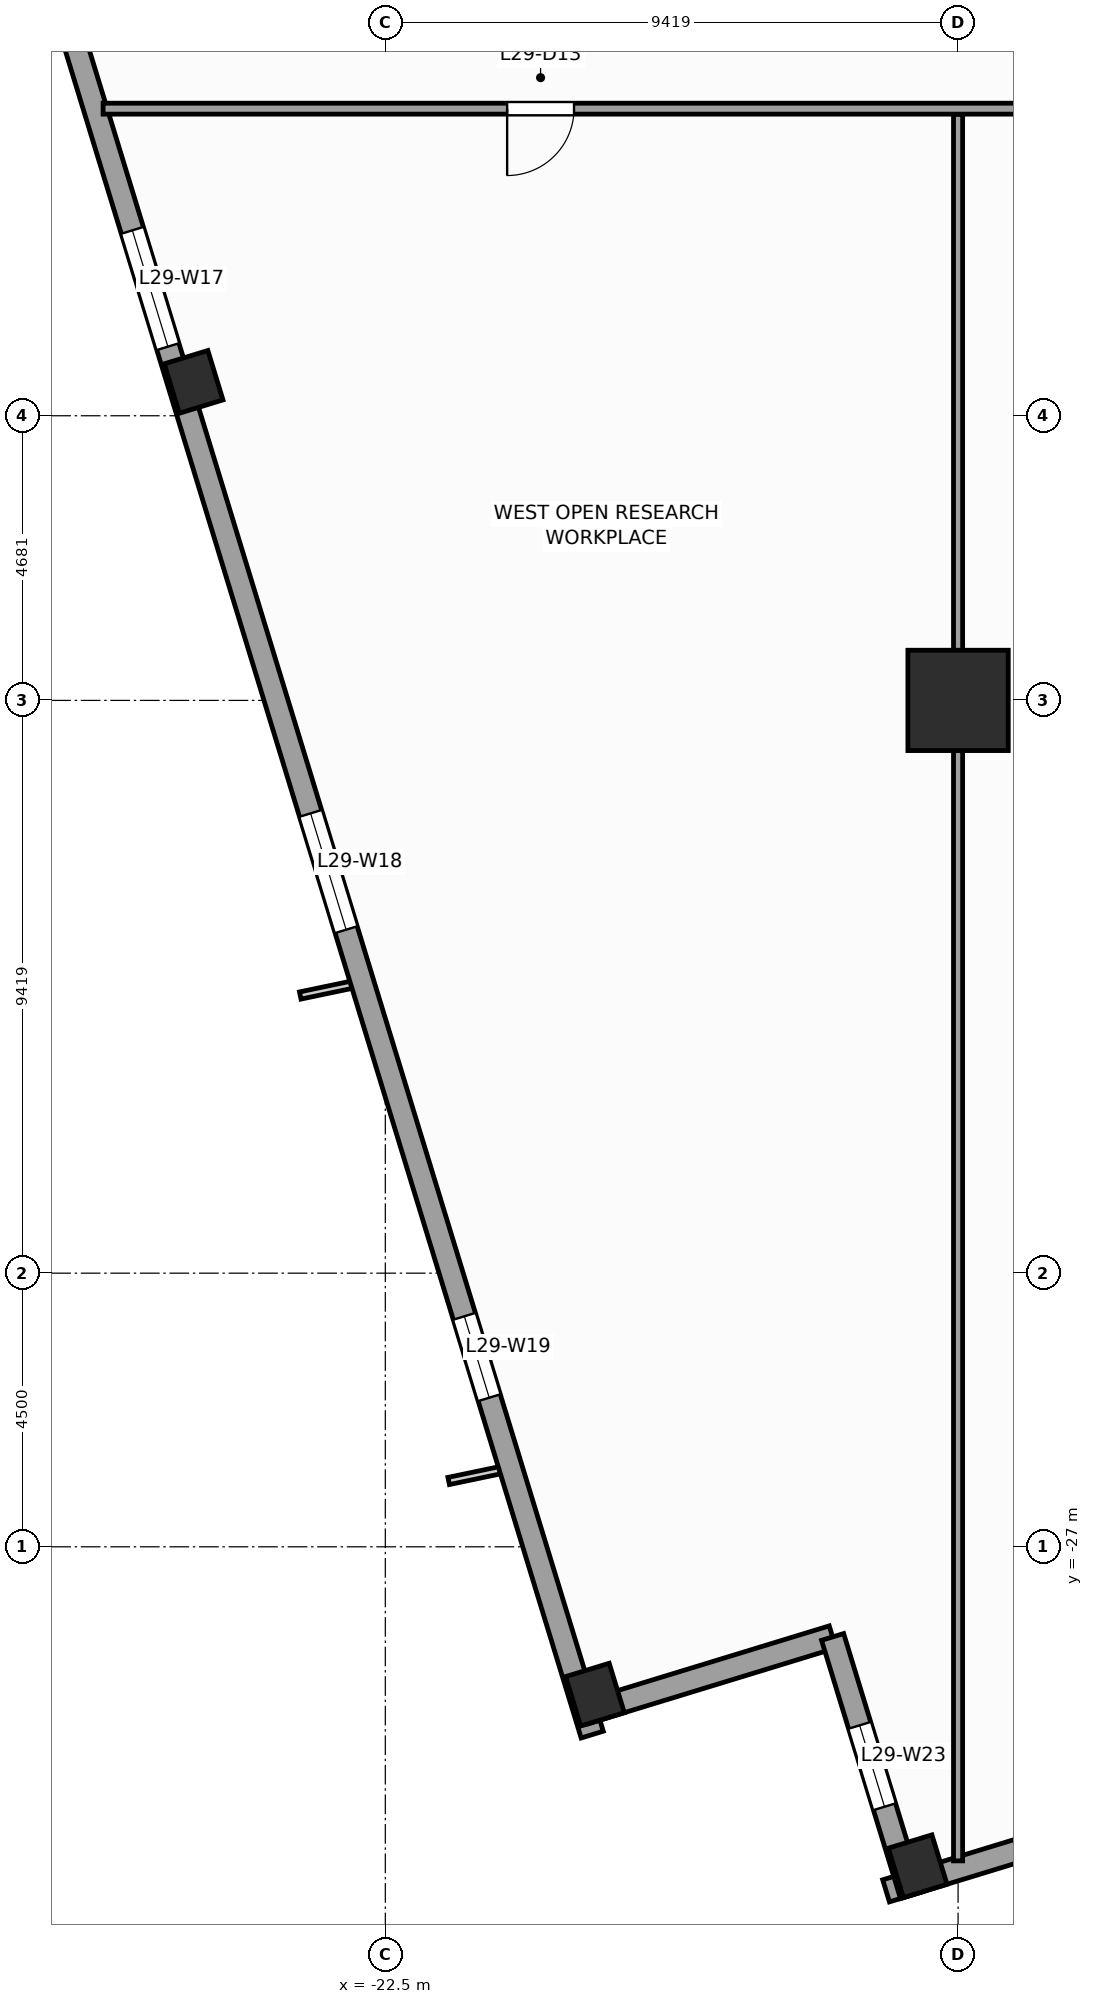
"""IFC4 building model, lengths in metres.
Left out: names, types, materials, properties, quantities, classifications, styles, units other than length and angle.
Written with IfcOpenShell. Run it as: python <this file> out.ifc"""

import sys

from ifc_helpers import new_model, si_unit, direction, frame, frame_2d, origin, origin_2d, place, context, subcontext, project, spatial, rectangle, extrude, source, transform, mapped, element, fill, save


model = new_model("IFC4")
c1 = context("Model", 3, precision=1e-05, world=origin(), true_north=direction((0.0, 1.0)))
c2 = subcontext(c1, "Body", "Model", "MODEL_VIEW")
j1 = project(units=[si_unit("LENGTHUNIT", "METRE"), si_unit("PLANEANGLEUNIT", "RADIAN")], contexts=[c1])
p1 = place(None, origin())
s1 = spatial("IfcSite", under=j1, at=p1, CompositionType="ELEMENT")
p2 = place(p1, origin())
s2 = spatial("IfcBuilding", under=s1, at=p2, CompositionType="ELEMENT")
p3 = place(p2, frame((0.0, 0.0, 123.2)))
s3 = spatial("IfcBuildingStorey", under=s2, at=p3, CompositionType="ELEMENT", Elevation=123.2)
m1 = source(origin(), c2, "Body", "SweptSolid", [
    extrude(rectangle(XDim=1.65, YDim=1.65, at=origin_2d()), origin(), (0.0, 0.0, 1.0), 4.0),
])
p4 = place(p3, frame((-13.081, -13.081, 0.0), z_axis=(0.0, 0.0, 1.0), x_axis=(1.0, 0.0, 0.0)))
e1 = element("IfcColumn", 1, at=p4, inside=s3, PredefinedType="COLUMN", context=c2, shape_type="MappedRepresentation", body=[
    mapped(m1, transform((0.0, 0.0, 0.0), scale=1.0)),
])
m2 = source(origin(), c2, "Body", "SweptSolid", [
    extrude(rectangle(XDim=0.75, YDim=0.85, at=origin_2d()), origin(), (0.0, 0.0, 1.0), 4.0),
])
for number, where, z_axis, x_axis in (
    (2, (-13.746, -32.253, 0.0), (0.0, 0.0, 1.0), (0.956, 0.292, 0.0)),
    (3, (-25.653, -7.843, 0.0), (0.0, 0.0, 1.0), (0.956, 0.292, 0.0)),
    (4, (-19.052, -29.431, 0.0), (0.0, 0.0, 1.0), (0.956, 0.292, 0.0)),
):
    element("IfcColumn", number, at=place(p3, frame(where, z_axis=z_axis, x_axis=x_axis)), inside=s3, PredefinedType="COLUMN", context=c2, shape_type="MappedRepresentation", body=[
        mapped(m2, transform((0.0, 0.0, 0.0), scale=1.0)),
    ])
p5 = place(p3, frame((-14.265, -32.658, 0.0), z_axis=(0.0, 0.0, 1.0), x_axis=(0.956304320851, 0.292373127906, 0.0)))
e5 = element("IfcWall", 5, at=p5, inside=s3, PredefinedType="STANDARD", context=c2, shape_type="SweptSolid", body=[
    extrude(rectangle(XDim=46.38, YDim=0.38, at=frame_2d((23.19, 0.0))), origin(), (0.0, 0.0, 1.0), 3.14),
])
p6 = place(p5, frame((28.265, 0.0, 0.0)))
e6 = element("IfcOpeningElement", 6, at=p6, cuts=e5, PredefinedType="OPENING", context=c2, shape_type="SweptSolid", body=[
    extrude(rectangle(XDim=1.05, YDim=2.25, at=frame_2d((0.525, 1.125))), frame((0.0, 0.2, 0.0), z_axis=(0.0, -1.0, 0.0), x_axis=(1.0, 0.0, 0.0)), (0.0, 0.0, 1.0), 0.4),
])
p7 = place(p5, frame((4.865, 0.0, 0.51)))
e7 = element("IfcOpeningElement", 7, at=p7, cuts=e5, PredefinedType="OPENING", context=c2, shape_type="SweptSolid", body=[
    extrude(rectangle(XDim=1.4, YDim=2.4, at=frame_2d((0.7, 1.2))), frame((0.0, 0.2, 0.0), z_axis=(0.0, -1.0, 0.0), x_axis=(1.0, 0.0, 0.0)), (0.0, 0.0, 1.0), 0.4),
])
p8 = place(p5, frame((10.95, 0.0, 0.51)))
e8 = element("IfcOpeningElement", 8, at=p8, cuts=e5, PredefinedType="OPENING", context=c2, shape_type="SweptSolid", body=[
    extrude(rectangle(XDim=2.0, YDim=2.4, at=frame_2d((1.0, 1.2))), frame((0.0, 0.2, 0.0), z_axis=(0.0, -1.0, 0.0), x_axis=(1.0, 0.0, 0.0)), (0.0, 0.0, 1.0), 0.4),
])
p9 = place(p5, frame((20.512, 0.0, 0.51)))
e9 = element("IfcOpeningElement", 9, at=p9, cuts=e5, PredefinedType="OPENING", context=c2, shape_type="SweptSolid", body=[
    extrude(rectangle(XDim=2.0, YDim=2.4, at=frame_2d((1.0, 1.2))), frame((0.0, 0.2, 0.0), z_axis=(0.0, -1.0, 0.0), x_axis=(1.0, 0.0, 0.0)), (0.0, 0.0, 1.0), 0.4),
])
p10 = place(p5, frame((30.538, 0.0, 0.51)))
e10 = element("IfcOpeningElement", 10, at=p10, cuts=e5, PredefinedType="OPENING", context=c2, shape_type="SweptSolid", body=[
    extrude(rectangle(XDim=2.0, YDim=2.4, at=frame_2d((1.0, 1.2))), frame((0.0, 0.2, 0.0), z_axis=(0.0, -1.0, 0.0), x_axis=(1.0, 0.0, 0.0)), (0.0, 0.0, 1.0), 0.4),
])
p11 = place(p5, frame((39.187, 0.0, 0.51)))
e11 = element("IfcOpeningElement", 11, at=p11, cuts=e5, PredefinedType="OPENING", context=c2, shape_type="SweptSolid", body=[
    extrude(rectangle(XDim=1.4, YDim=2.4, at=frame_2d((0.7, 1.2))), frame((0.0, 0.2, 0.0), z_axis=(0.0, -1.0, 0.0), x_axis=(1.0, 0.0, 0.0)), (0.0, 0.0, 1.0), 0.4),
])
p12 = place(p3, frame((-32.658, 14.265, 0.0), z_axis=(0.0, 0.0, 1.0), x_axis=(0.292373127906, -0.956304320851, 0.0)))
e12 = element("IfcWall", 12, at=p12, inside=s3, PredefinedType="STANDARD", context=c2, shape_type="SweptSolid", body=[
    extrude(rectangle(XDim=46.38, YDim=0.38, at=frame_2d((23.19, 0.0))), origin(), (0.0, 0.0, 1.0), 3.14),
])
p13 = place(p12, frame((4.865, 0.0, 0.51)))
e13 = element("IfcOpeningElement", 13, at=p13, cuts=e12, PredefinedType="OPENING", context=c2, shape_type="SweptSolid", body=[
    extrude(rectangle(XDim=1.4, YDim=2.4, at=frame_2d((0.7, 1.2))), frame((0.0, 0.2, 0.0), z_axis=(0.0, -1.0, 0.0), x_axis=(1.0, 0.0, 0.0)), (0.0, 0.0, 1.0), 0.4),
])
p14 = place(p12, frame((12.45, 0.0, 0.51)))
e14 = element("IfcOpeningElement", 14, at=p14, cuts=e12, PredefinedType="OPENING", context=c2, shape_type="SweptSolid", body=[
    extrude(rectangle(XDim=2.0, YDim=2.4, at=frame_2d((1.0, 1.2))), frame((0.0, 0.2, 0.0), z_axis=(0.0, -1.0, 0.0), x_axis=(1.0, 0.0, 0.0)), (0.0, 0.0, 1.0), 0.4),
])
p15 = place(p12, frame((20.512, 0.0, 0.51)))
e15 = element("IfcOpeningElement", 15, at=p15, cuts=e12, PredefinedType="OPENING", context=c2, shape_type="SweptSolid", body=[
    extrude(rectangle(XDim=2.0, YDim=2.4, at=frame_2d((1.0, 1.2))), frame((0.0, 0.2, 0.0), z_axis=(0.0, -1.0, 0.0), x_axis=(1.0, 0.0, 0.0)), (0.0, 0.0, 1.0), 0.4),
])
p16 = place(p12, frame((30.538, 0.0, 0.51)))
e16 = element("IfcOpeningElement", 16, at=p16, cuts=e12, PredefinedType="OPENING", context=c2, shape_type="SweptSolid", body=[
    extrude(rectangle(XDim=2.0, YDim=2.4, at=frame_2d((1.0, 1.2))), frame((0.0, 0.2, 0.0), z_axis=(0.0, -1.0, 0.0), x_axis=(1.0, 0.0, 0.0)), (0.0, 0.0, 1.0), 0.4),
])
p17 = place(p12, frame((39.187, 0.0, 0.51)))
e17 = element("IfcOpeningElement", 17, at=p17, cuts=e12, PredefinedType="OPENING", context=c2, shape_type="SweptSolid", body=[
    extrude(rectangle(XDim=1.4, YDim=2.4, at=frame_2d((0.7, 1.2))), frame((0.0, 0.2, 0.0), z_axis=(0.0, -1.0, 0.0), x_axis=(1.0, 0.0, 0.0)), (0.0, 0.0, 1.0), 0.4),
])
p18 = place(p3, frame((-19.208, -29.725, 0.0), z_axis=(0.0, 0.0, 1.0), x_axis=(0.956312764915, 0.292345507338, 0.0)))
e18 = element("IfcWall", 18, at=p18, inside=s3, PredefinedType="STANDARD", context=c2, shape_type="SweptSolid", body=[
    extrude(rectangle(XDim=4.25, YDim=0.38, at=frame_2d((2.125, 0.0))), origin(), (0.0, 0.0, 1.0), 3.74),
])
p19 = place(p3, frame((-15.144, -28.482, 0.0), z_axis=(0.0, 0.0, 1.0), x_axis=(0.292373601522, -0.956304176051, 0.0)))
e19 = element("IfcWall", 19, at=p19, inside=s3, PredefinedType="STANDARD", context=c2, shape_type="SweptSolid", body=[
    extrude(rectangle(XDim=4.44, YDim=0.38, at=frame_2d((2.22, 0.0))), origin(), (0.0, 0.0, 1.0), 3.04),
])
p20 = place(p19, frame((1.52, 0.0, 0.51)))
e20 = element("IfcOpeningElement", 20, at=p20, cuts=e19, PredefinedType="OPENING", context=c2, shape_type="SweptSolid", body=[
    extrude(rectangle(XDim=1.4, YDim=2.4, at=frame_2d((0.7, 1.2))), frame((0.0, 0.2, 0.0), z_axis=(0.0, -1.0, 0.0), x_axis=(1.0, 0.0, 0.0)), (0.0, 0.0, 1.0), 0.4),
])
p21 = place(p3, frame((-27.142, -3.35, 0.0), z_axis=(0.0, 0.0, 1.0), x_axis=(1.0, 0.0, 0.0)))
e21 = element("IfcWall", 21, at=p21, inside=s3, PredefinedType="PARTITIONING", context=c2, shape_type="SweptSolid", body=[
    extrude(rectangle(XDim=16.592, YDim=0.18, at=frame_2d((8.296, 0.0))), origin(), (0.0, 0.0, 1.0), 3.74),
])
p22 = place(p21, frame((6.645, 0.0, 0.0)))
e22 = element("IfcOpeningElement", 22, at=p22, cuts=e21, PredefinedType="OPENING", context=c2, shape_type="SweptSolid", body=[
    extrude(rectangle(XDim=1.1, YDim=2.2, at=frame_2d((0.55, 1.1))), frame((0.0, 0.1, 0.0), z_axis=(0.0, -1.0, 0.0), x_axis=(1.0, 0.0, 0.0)), (0.0, 0.0, 1.0), 0.2),
])
p23 = place(p3, frame((-13.081, -32.165, 0.0), z_axis=(0.0, 0.0, 1.0), x_axis=(0.0, 1.0, 0.0)))
e23 = element("IfcWall", 23, at=p23, inside=s3, PredefinedType="PARTITIONING", context=c2, shape_type="SweptSolid", body=[
    extrude(rectangle(XDim=28.72, YDim=0.15, at=frame_2d((14.36, 0.0))), origin(), (0.0, 0.0, 1.0), 2.732),
])
m3 = source(origin(), c2, "Body", "SweptSolid", [
    extrude(rectangle(XDim=2.0, YDim=2.4, at=frame_2d((1.0, 1.2))), frame((0.0, 0.03, 0.0), z_axis=(0.0, -1.0, 0.0), x_axis=(1.0, 0.0, 0.0)), (0.0, 0.0, 1.0), 0.06),
])
p24 = place(p15, origin())
e24 = element("IfcWindow", 24, at=p24, inside=s3, PartitioningType="SINGLE_PANEL", PredefinedType="WINDOW", context=c2, shape_type="MappedRepresentation", body=[
    mapped(m3, transform((0.0, 0.0, 0.0), scale=1.0)),
])
fill(e15, e24)
p25 = place(p16, origin())
e25 = element("IfcWindow", 25, at=p25, inside=s3, PartitioningType="SINGLE_PANEL", PredefinedType="WINDOW", context=c2, shape_type="MappedRepresentation", body=[
    mapped(m3, transform((0.0, 0.0, 0.0), scale=1.0)),
])
fill(e16, e25)
m4 = source(origin(), c2, "Body", "SweptSolid", [
    extrude(rectangle(XDim=1.4, YDim=2.4, at=frame_2d((0.7, 1.2))), frame((0.0, 0.03, 0.0), z_axis=(0.0, -1.0, 0.0), x_axis=(1.0, 0.0, 0.0)), (0.0, 0.0, 1.0), 0.06),
])
p26 = place(p17, origin())
e26 = element("IfcWindow", 26, at=p26, inside=s3, PartitioningType="SINGLE_PANEL", PredefinedType="WINDOW", context=c2, shape_type="MappedRepresentation", body=[
    mapped(m4, transform((0.0, 0.0, 0.0), scale=1.0)),
])
fill(e17, e26)
p27 = place(p20, origin())
e27 = element("IfcWindow", 27, at=p27, inside=s3, PartitioningType="SINGLE_PANEL", PredefinedType="WINDOW", context=c2, shape_type="MappedRepresentation", body=[
    mapped(m4, transform((0.0, 0.0, 0.0), scale=1.0)),
])
fill(e20, e27)
m5 = source(origin(), c2, "Body", "SweptSolid", [
    extrude(rectangle(XDim=1.1, YDim=2.2, at=frame_2d((0.55, 1.1))), frame((0.0, 0.025, 0.0), z_axis=(0.0, -1.0, 0.0), x_axis=(1.0, 0.0, 0.0)), (0.0, 0.0, 1.0), 0.05),
])
p28 = place(p22, frame((1.1, 0.0, 0.0), z_axis=(0.0, 0.0, 1.0), x_axis=(-1.0, 0.0, 0.0)))
e28 = element("IfcDoor", 28, at=p28, inside=s3, OperationType="SINGLE_SWING_LEFT", PredefinedType="DOOR", context=c2, shape_type="MappedRepresentation", body=[
    mapped(m5, transform((0.0, 0.0, 0.0), scale=1.0)),
])
fill(e22, e28)
save(model, sys.argv[1])
